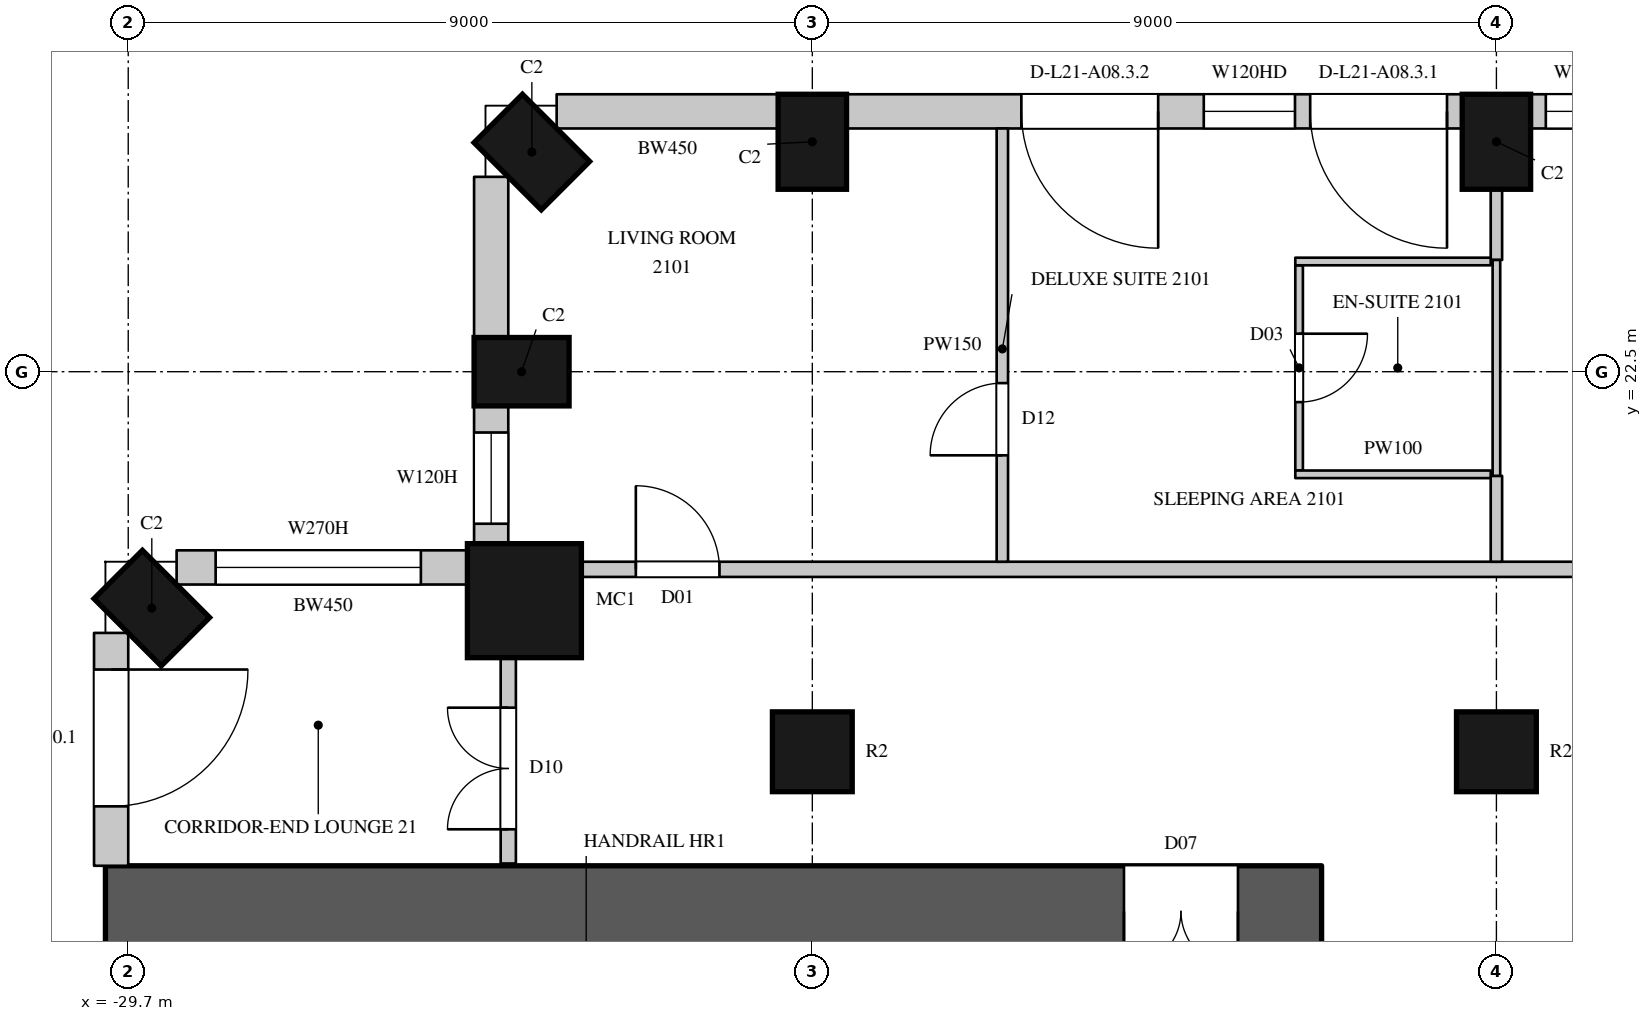
"""IFC4 building model, lengths in metres.
Left out: names, types, materials, properties, quantities, classifications, styles, units other than length and angle.
Written with IfcOpenShell. Run it as: python <this file> out.ifc"""

import sys

from ifc_helpers import new_model, si_unit, direction, frame, frame_2d, origin, origin_2d, place, context, subcontext, project, spatial, rectangle, circle, extrude, element, fill, save


model = new_model("IFC4")
c1 = context("Model", 3, precision=1e-05, world=origin(), true_north=direction((0.0, 1.0)))
c2 = subcontext(c1, "Body", "Model", "MODEL_VIEW")
j1 = project(units=[si_unit("LENGTHUNIT", "METRE"), si_unit("PLANEANGLEUNIT", "RADIAN")], contexts=[c1])
p1 = place(None, origin())
s1 = spatial("IfcSite", under=j1, at=p1, CompositionType="ELEMENT")
p2 = place(p1, origin())
s2 = spatial("IfcBuilding", under=s1, at=p2, CompositionType="ELEMENT")
p3 = place(p2, frame((0.0, 0.0, 105.9)))
s3 = spatial("IfcBuildingStorey", under=s2, at=p3, CompositionType="ELEMENT", Elevation=105.9)
for number, where, z_axis, x_axis in (
    (1, (-29.39, 19.39, 0.0), (0.0, 0.0, 1.0), (-0.707, -0.707, 0.0)),
    (2, (-11.7, 25.525, 0.0), (0.0, 0.0, 1.0), (-1.0, 0.0, 0.0)),
    (3, (-20.7, 25.525, 0.0), (0.0, 0.0, 1.0), (-1.0, 0.0, 0.0)),
    (4, (-24.39, 25.39, 0.0), (0.0, 0.0, 1.0), (-0.707, -0.707, 0.0)),
    (5, (-24.525, 22.5, 0.0), (0.0, 0.0, 1.0), (0.0, -1.0, 0.0)),
):
    element("IfcColumn", number, at=place(p3, frame(where, z_axis=z_axis, x_axis=x_axis)), inside=s3, PredefinedType="COLUMN", context=c2, shape_type="SweptSolid", body=[
        extrude(rectangle(XDim=0.9, YDim=1.25, at=origin_2d()), origin(), (0.0, 0.0, 1.0), 3.6),
    ])
p4 = place(p3, frame((-24.488, 19.488, 0.0), z_axis=(0.0, 0.0, 1.0), x_axis=(1.0, 0.0, 0.0)))
e6 = element("IfcColumn", 6, at=p4, inside=s3, PredefinedType="COLUMN", context=c2, shape_type="SweptSolid", body=[
    extrude(circle(Radius=0.75, at=origin_2d()), origin(), (0.0, 0.0, 1.0), 3.6),
])
for number, where, z_axis, x_axis in (
    (7, (-20.7, 17.5, 0.0), (0.0, 0.0, 1.0), (1.0, 0.0, 0.0)),
    (8, (-11.7, 17.5, 0.0), (0.0, 0.0, 1.0), (1.0, 0.0, 0.0)),
):
    element("IfcColumn", number, at=place(p3, frame(where, z_axis=z_axis, x_axis=x_axis)), inside=s3, PredefinedType="COLUMN", context=c2, shape_type="SweptSolid", body=[
        extrude(circle(Radius=0.525, at=origin_2d()), origin(), (0.0, 0.0, 1.0), 3.6),
    ])
p5 = place(p3, frame((-29.925, 19.064, 0.0), z_axis=(0.0, 0.0, 1.0), x_axis=(0.0, -1.0, 0.0)))
e9 = element("IfcWall", 9, at=p5, inside=s3, PredefinedType="SOLIDWALL", context=c2, shape_type="SweptSolid", body=[
    extrude(rectangle(XDim=3.064, YDim=0.45, at=frame_2d((1.532, 0.0))), origin(), (0.0, 0.0, 1.0), 3.3),
])
p6 = place(p5, frame((0.482, 0.0, 0.0)))
e10 = element("IfcOpeningElement", 10, at=p6, cuts=e9, PredefinedType="OPENING", context=c2, shape_type="SweptSolid", body=[
    extrude(rectangle(XDim=1.8, YDim=2.4, at=frame_2d((0.9, 1.2))), frame((0.0, 0.235, 0.0), z_axis=(0.0, -1.0, 0.0), x_axis=(1.0, 0.0, 0.0)), (0.0, 0.0, 1.0), 0.47),
])
p7 = place(p3, frame((-3.15, 25.925, 0.0), z_axis=(0.0, 0.0, 1.0), x_axis=(-1.0, 0.0, 0.0)))
e11 = element("IfcWall", 11, at=p7, inside=s3, PredefinedType="SOLIDWALL", context=c2, shape_type="SweptSolid", body=[
    extrude(rectangle(XDim=8.1, YDim=0.45, at=frame_2d((4.05, 0.0))), origin(), (0.0, 0.0, 1.0), 3.3),
])
p8 = place(p7, frame((0.2, 0.0, 0.0)))
e12 = element("IfcOpeningElement", 12, at=p8, cuts=e11, PredefinedType="OPENING", context=c2, shape_type="SweptSolid", body=[
    extrude(rectangle(XDim=1.8, YDim=2.4, at=frame_2d((0.9, 1.2))), frame((0.0, 0.235, 0.0), z_axis=(0.0, -1.0, 0.0), x_axis=(1.0, 0.0, 0.0)), (0.0, 0.0, 1.0), 0.47),
])
p9 = place(p7, frame((2.2, 0.0, 1.05)))
e13 = element("IfcOpeningElement", 13, at=p9, cuts=e11, PredefinedType="OPENING", context=c2, shape_type="SweptSolid", body=[
    extrude(rectangle(XDim=1.2, YDim=2.0, at=frame_2d((0.6, 1.0))), frame((0.0, 0.235, 0.0), z_axis=(0.0, -1.0, 0.0), x_axis=(1.0, 0.0, 0.0)), (0.0, 0.0, 1.0), 0.47),
])
p10 = place(p7, frame((4.7, 0.0, 0.0)))
e14 = element("IfcOpeningElement", 14, at=p10, cuts=e11, PredefinedType="OPENING", context=c2, shape_type="SweptSolid", body=[
    extrude(rectangle(XDim=1.8, YDim=2.4, at=frame_2d((0.9, 1.2))), frame((0.0, 0.235, 0.0), z_axis=(0.0, -1.0, 0.0), x_axis=(1.0, 0.0, 0.0)), (0.0, 0.0, 1.0), 0.47),
])
p11 = place(p7, frame((6.7, 0.0, 1.05)))
e15 = element("IfcOpeningElement", 15, at=p11, cuts=e11, PredefinedType="OPENING", context=c2, shape_type="SweptSolid", body=[
    extrude(rectangle(XDim=1.2, YDim=2.0, at=frame_2d((0.6, 1.0))), frame((0.0, 0.235, 0.0), z_axis=(0.0, -1.0, 0.0), x_axis=(1.0, 0.0, 0.0)), (0.0, 0.0, 1.0), 0.47),
])
p12 = place(p3, frame((-12.15, 25.925, 0.0), z_axis=(0.0, 0.0, 1.0), x_axis=(-1.0, 0.0, 0.0)))
e16 = element("IfcWall", 16, at=p12, inside=s3, PredefinedType="SOLIDWALL", context=c2, shape_type="SweptSolid", body=[
    extrude(rectangle(XDim=8.1, YDim=0.45, at=frame_2d((4.05, 0.0))), origin(), (0.0, 0.0, 1.0), 3.3),
])
p13 = place(p12, frame((0.2, 0.0, 0.0)))
e17 = element("IfcOpeningElement", 17, at=p13, cuts=e16, PredefinedType="OPENING", context=c2, shape_type="SweptSolid", body=[
    extrude(rectangle(XDim=1.8, YDim=2.4, at=frame_2d((0.9, 1.2))), frame((0.0, 0.235, 0.0), z_axis=(0.0, -1.0, 0.0), x_axis=(1.0, 0.0, 0.0)), (0.0, 0.0, 1.0), 0.47),
])
p14 = place(p12, frame((2.2, 0.0, 1.05)))
e18 = element("IfcOpeningElement", 18, at=p14, cuts=e16, PredefinedType="OPENING", context=c2, shape_type="SweptSolid", body=[
    extrude(rectangle(XDim=1.2, YDim=2.0, at=frame_2d((0.6, 1.0))), frame((0.0, 0.235, 0.0), z_axis=(0.0, -1.0, 0.0), x_axis=(1.0, 0.0, 0.0)), (0.0, 0.0, 1.0), 0.47),
])
p15 = place(p12, frame((4.0, 0.0, 0.0)))
e19 = element("IfcOpeningElement", 19, at=p15, cuts=e16, PredefinedType="OPENING", context=c2, shape_type="SweptSolid", body=[
    extrude(rectangle(XDim=1.8, YDim=2.4, at=frame_2d((0.9, 1.2))), frame((0.0, 0.235, 0.0), z_axis=(0.0, -1.0, 0.0), x_axis=(1.0, 0.0, 0.0)), (0.0, 0.0, 1.0), 0.47),
])
p16 = place(p3, frame((-21.15, 25.925, 0.0), z_axis=(0.0, 0.0, 1.0), x_axis=(-1.0, 0.0, 0.0)))
e20 = element("IfcWall", 20, at=p16, inside=s3, PredefinedType="SOLIDWALL", context=c2, shape_type="SweptSolid", body=[
    extrude(rectangle(XDim=2.914, YDim=0.45, at=frame_2d((1.457, 0.0))), origin(), (0.0, 0.0, 1.0), 3.3),
])
p17 = place(p3, frame((-24.925, 25.064, 0.0), z_axis=(0.0, 0.0, 1.0), x_axis=(0.0, -1.0, 0.0)))
e21 = element("IfcWall", 21, at=p17, inside=s3, PredefinedType="SOLIDWALL", context=c2, shape_type="SweptSolid", body=[
    extrude(rectangle(XDim=2.114, YDim=0.45, at=frame_2d((1.057, 0.0))), origin(), (0.0, 0.0, 1.0), 3.3),
])
p18 = place(p3, frame((-24.925, 22.05, 0.0), z_axis=(0.0, 0.0, 1.0), x_axis=(0.0, -1.0, 0.0)))
e22 = element("IfcWall", 22, at=p18, inside=s3, PredefinedType="SOLIDWALL", context=c2, shape_type="SweptSolid", body=[
    extrude(rectangle(XDim=1.843, YDim=0.45, at=frame_2d((0.921, 0.0))), origin(), (0.0, 0.0, 1.0), 3.3),
])
p19 = place(p18, frame((0.35, 0.0, 1.05)))
e23 = element("IfcOpeningElement", 23, at=p19, cuts=e22, PredefinedType="OPENING", context=c2, shape_type="SweptSolid", body=[
    extrude(rectangle(XDim=1.2, YDim=2.0, at=frame_2d((0.6, 1.0))), frame((0.0, 0.235, 0.0), z_axis=(0.0, -1.0, 0.0), x_axis=(1.0, 0.0, 0.0)), (0.0, 0.0, 1.0), 0.47),
])
p20 = place(p3, frame((-25.207, 19.925, 0.0), z_axis=(0.0, 0.0, 1.0), x_axis=(-1.0, 0.0, 0.0)))
e24 = element("IfcWall", 24, at=p20, inside=s3, PredefinedType="SOLIDWALL", context=c2, shape_type="SweptSolid", body=[
    extrude(rectangle(XDim=3.857, YDim=0.45, at=frame_2d((1.928, 0.0))), origin(), (0.0, 0.0, 1.0), 3.3),
])
p21 = place(p20, frame((0.643, 0.0, 1.05)))
e25 = element("IfcOpeningElement", 25, at=p21, cuts=e24, PredefinedType="OPENING", context=c2, shape_type="SweptSolid", body=[
    extrude(rectangle(XDim=2.7, YDim=2.0, at=frame_2d((1.35, 1.0))), frame((0.0, 0.235, 0.0), z_axis=(0.0, -1.0, 0.0), x_axis=(1.0, 0.0, 0.0)), (0.0, 0.0, 1.0), 0.47),
])
p22 = place(p3, frame((-30.0, 15.4, 0.0), z_axis=(0.0, 0.0, 1.0), x_axis=(1.0, 0.0, 0.0)))
e26 = element("IfcWall", 26, at=p22, inside=s3, PredefinedType="SHEAR", context=c2, shape_type="SweptSolid", body=[
    extrude(rectangle(XDim=16.0, YDim=1.2, at=frame_2d((8.0, 0.0))), origin(), (0.0, 0.0, 1.0), 3.6),
])
p23 = place(p22, frame((13.4, 0.0, 0.0)))
e27 = element("IfcOpeningElement", 27, at=p23, cuts=e26, PredefinedType="OPENING", context=c2, shape_type="SweptSolid", body=[
    extrude(rectangle(XDim=1.5, YDim=2.4, at=frame_2d((0.75, 1.2))), frame((0.0, 0.61, 0.0), z_axis=(0.0, -1.0, 0.0), x_axis=(1.0, 0.0, 0.0)), (0.0, 0.0, 1.0), 1.22),
])
p24 = place(p3, frame((-24.7, 16.03, 0.0), z_axis=(0.0, 0.0, 1.0), x_axis=(0.0, 1.0, 0.0)))
e28 = element("IfcWall", 28, at=p24, inside=s3, PredefinedType="PARTITIONING", context=c2, shape_type="SweptSolid", body=[
    extrude(rectangle(XDim=2.722, YDim=0.2, at=frame_2d((1.361, 0.0))), origin(), (0.0, 0.0, 1.0), 3.3),
])
p25 = place(p24, frame((0.45, 0.0, 0.0)))
e29 = element("IfcOpeningElement", 29, at=p25, cuts=e28, PredefinedType="OPENING", context=c2, shape_type="SweptSolid", body=[
    extrude(rectangle(XDim=1.6, YDim=2.4, at=frame_2d((0.8, 1.2))), frame((0.0, 0.11, 0.0), z_axis=(0.0, -1.0, 0.0), x_axis=(1.0, 0.0, 0.0)), (0.0, 0.0, 1.0), 0.22),
])
p26 = place(p3, frame((-23.822, 19.9, 0.0), z_axis=(0.0, 0.0, 1.0), x_axis=(1.0, 0.0, 0.0)))
e30 = element("IfcWall", 30, at=p26, inside=s3, PredefinedType="PARTITIONING", context=c2, shape_type="SweptSolid", body=[
    extrude(rectangle(XDim=41.605, YDim=0.2, at=frame_2d((20.803, 0.0))), origin(), (0.0, 0.0, 1.0), 3.3),
])
p27 = place(p26, frame((14.25, 0.0, 0.0)))
e31 = element("IfcOpeningElement", 31, at=p27, cuts=e30, PredefinedType="OPENING", context=c2, shape_type="SweptSolid", body=[
    extrude(rectangle(XDim=0.9, YDim=2.2, at=frame_2d((0.45, 1.1))), frame((0.0, 0.11, 0.0), z_axis=(0.0, -1.0, 0.0), x_axis=(1.0, 0.0, 0.0)), (0.0, 0.0, 1.0), 0.22),
])
p28 = place(p26, frame((27.1, 0.0, 0.0)))
e32 = element("IfcOpeningElement", 32, at=p28, cuts=e30, PredefinedType="OPENING", context=c2, shape_type="SweptSolid", body=[
    extrude(rectangle(XDim=0.9, YDim=2.2, at=frame_2d((0.45, 1.1))), frame((0.0, 0.11, 0.0), z_axis=(0.0, -1.0, 0.0), x_axis=(1.0, 0.0, 0.0)), (0.0, 0.0, 1.0), 0.22),
])
p29 = place(p26, frame((0.8, 0.0, 0.0)))
e33 = element("IfcOpeningElement", 33, at=p29, cuts=e30, PredefinedType="OPENING", context=c2, shape_type="SweptSolid", body=[
    extrude(rectangle(XDim=1.1, YDim=2.4, at=frame_2d((0.55, 1.2))), frame((0.0, 0.11, 0.0), z_axis=(0.0, -1.0, 0.0), x_axis=(1.0, 0.0, 0.0)), (0.0, 0.0, 1.0), 0.22),
])
p30 = place(p26, frame((23.2, 0.0, 0.0)))
e34 = element("IfcOpeningElement", 34, at=p30, cuts=e30, PredefinedType="OPENING", context=c2, shape_type="SweptSolid", body=[
    extrude(rectangle(XDim=0.95, YDim=2.2, at=frame_2d((0.475, 1.1))), frame((0.0, 0.11, 0.0), z_axis=(0.0, -1.0, 0.0), x_axis=(1.0, 0.0, 0.0)), (0.0, 0.0, 1.0), 0.22),
])
p31 = place(p26, frame((35.0, 0.0, 0.0)))
e35 = element("IfcOpeningElement", 35, at=p31, cuts=e30, PredefinedType="OPENING", context=c2, shape_type="SweptSolid", body=[
    extrude(rectangle(XDim=0.95, YDim=2.2, at=frame_2d((0.475, 1.1))), frame((0.0, 0.11, 0.0), z_axis=(0.0, -1.0, 0.0), x_axis=(1.0, 0.0, 0.0)), (0.0, 0.0, 1.0), 0.22),
])
p32 = place(p3, frame((-18.2, 20.0, 0.0), z_axis=(0.0, 0.0, 1.0), x_axis=(0.0, 1.0, 0.0)))
e36 = element("IfcWall", 36, at=p32, inside=s3, PredefinedType="PARTITIONING", context=c2, shape_type="SweptSolid", body=[
    extrude(rectangle(XDim=5.7, YDim=0.15, at=frame_2d((2.85, 0.0))), origin(), (0.0, 0.0, 1.0), 3.3),
])
p33 = place(p32, frame((1.4, 0.0, 0.0)))
e37 = element("IfcOpeningElement", 37, at=p33, cuts=e36, PredefinedType="OPENING", context=c2, shape_type="SweptSolid", body=[
    extrude(rectangle(XDim=0.95, YDim=2.2, at=frame_2d((0.475, 1.1))), frame((0.0, 0.085, 0.0), z_axis=(0.0, -1.0, 0.0), x_axis=(1.0, 0.0, 0.0)), (0.0, 0.0, 1.0), 0.17),
])
p34 = place(p3, frame((-11.7, 20.0, 0.0), z_axis=(0.0, 0.0, 1.0), x_axis=(0.0, 1.0, 0.0)))
e38 = element("IfcWall", 38, at=p34, inside=s3, PredefinedType="PARTITIONING", context=c2, shape_type="SweptSolid", body=[
    extrude(rectangle(XDim=1.13, YDim=0.15, at=frame_2d((0.565, 0.0))), origin(), (0.0, 0.0, 1.0), 2.75),
])
p35 = place(p3, frame((-11.7, 23.97, 0.0), z_axis=(0.0, 0.0, 1.0), x_axis=(0.0, 1.0, 0.0)))
e39 = element("IfcWall", 39, at=p35, inside=s3, PredefinedType="PARTITIONING", context=c2, shape_type="SweptSolid", body=[
    extrude(rectangle(XDim=0.93, YDim=0.15, at=frame_2d((0.465, 0.0))), origin(), (0.0, 0.0, 1.0), 2.75),
])
p36 = place(p3, frame((-14.296, 21.2, 0.0), z_axis=(0.0, 0.0, 1.0), x_axis=(0.0, 1.0, 0.0)))
e40 = element("IfcWall", 40, at=p36, inside=s3, PredefinedType="PARTITIONING", context=c2, shape_type="SweptSolid", body=[
    extrude(rectangle(XDim=2.7, YDim=0.1, at=frame_2d((1.35, 0.0))), origin(), (0.0, 0.0, 1.0), 3.3),
])
p37 = place(p36, frame((0.9, 0.0, 0.0)))
e41 = element("IfcOpeningElement", 41, at=p37, cuts=e40, PredefinedType="OPENING", context=c2, shape_type="SweptSolid", body=[
    extrude(rectangle(XDim=0.9, YDim=2.2, at=frame_2d((0.45, 1.1))), frame((0.0, 0.06, 0.0), z_axis=(0.0, -1.0, 0.0), x_axis=(1.0, 0.0, 0.0)), (0.0, 0.0, 1.0), 0.12),
])
for number, where, z_axis, x_axis in (
    (42, (-14.346, 21.15, 0.0), (0.0, 0.0, 1.0), (1.0, 0.0, 0.0)),
    (43, (-14.346, 23.95, 0.0), (0.0, 0.0, 1.0), (1.0, 0.0, 0.0)),
):
    element("IfcWall", number, at=place(p3, frame(where, z_axis=z_axis, x_axis=x_axis)), inside=s3, PredefinedType="PARTITIONING", context=c2, shape_type="SweptSolid", body=[
        extrude(rectangle(XDim=2.571, YDim=0.1, at=frame_2d((1.286, 0.0))), origin(), (0.0, 0.0, 1.0), 3.3),
    ])
p38 = place(p3, frame((-11.7, 21.13, 0.0), z_axis=(0.0, 0.0, 1.0), x_axis=(0.0, 1.0, 0.0)))
e44 = element("IfcWall", 44, at=p38, inside=s3, PredefinedType="PARTITIONING", context=c2, shape_type="SweptSolid", body=[
    extrude(rectangle(XDim=2.84, YDim=0.1, at=frame_2d((1.42, 0.0))), origin(), (0.0, 0.0, 1.0), 2.75),
])
p39 = place(p6, origin())
e45 = element("IfcDoor", 45, at=p39, inside=s3, OperationType="SLIDING_TO_LEFT", PredefinedType="DOOR", context=c2, shape_type="SweptSolid", body=[
    extrude(rectangle(XDim=1.8, YDim=2.4, at=frame_2d((0.9, 1.2))), frame((0.0, 0.13, 0.0), z_axis=(0.0, -1.0, 0.0), x_axis=(1.0, 0.0, 0.0)), (0.0, 0.0, 1.0), 0.05),
])
fill(e10, e45)
p40 = place(p11, origin())
e46 = element("IfcWindow", 46, at=p40, inside=s3, PartitioningType="SINGLE_PANEL", PredefinedType="WINDOW", context=c2, shape_type="SweptSolid", body=[
    extrude(rectangle(XDim=1.2, YDim=2.0, at=frame_2d((0.6, 1.0))), frame((0.0, 0.135, 0.0), z_axis=(0.0, -1.0, 0.0), x_axis=(1.0, 0.0, 0.0)), (0.0, 0.0, 1.0), 0.06),
])
fill(e15, e46)
p41 = place(p13, origin())
e47 = element("IfcDoor", 47, at=p41, inside=s3, OperationType="SLIDING_TO_LEFT", PredefinedType="DOOR", context=c2, shape_type="SweptSolid", body=[
    extrude(rectangle(XDim=1.8, YDim=2.4, at=frame_2d((0.9, 1.2))), frame((0.0, 0.13, 0.0), z_axis=(0.0, -1.0, 0.0), x_axis=(1.0, 0.0, 0.0)), (0.0, 0.0, 1.0), 0.05),
])
fill(e17, e47)
p42 = place(p14, origin())
e48 = element("IfcWindow", 48, at=p42, inside=s3, PartitioningType="SINGLE_PANEL", PredefinedType="WINDOW", context=c2, shape_type="SweptSolid", body=[
    extrude(rectangle(XDim=1.2, YDim=2.0, at=frame_2d((0.6, 1.0))), frame((0.0, 0.135, 0.0), z_axis=(0.0, -1.0, 0.0), x_axis=(1.0, 0.0, 0.0)), (0.0, 0.0, 1.0), 0.06),
])
fill(e18, e48)
p43 = place(p15, origin())
e49 = element("IfcDoor", 49, at=p43, inside=s3, OperationType="SLIDING_TO_LEFT", PredefinedType="DOOR", context=c2, shape_type="SweptSolid", body=[
    extrude(rectangle(XDim=1.8, YDim=2.4, at=frame_2d((0.9, 1.2))), frame((0.0, 0.13, 0.0), z_axis=(0.0, -1.0, 0.0), x_axis=(1.0, 0.0, 0.0)), (0.0, 0.0, 1.0), 0.05),
])
fill(e19, e49)
p44 = place(p19, origin())
e50 = element("IfcWindow", 50, at=p44, inside=s3, PartitioningType="SINGLE_PANEL", PredefinedType="WINDOW", context=c2, shape_type="SweptSolid", body=[
    extrude(rectangle(XDim=1.2, YDim=2.0, at=frame_2d((0.6, 1.0))), frame((0.0, 0.135, 0.0), z_axis=(0.0, -1.0, 0.0), x_axis=(1.0, 0.0, 0.0)), (0.0, 0.0, 1.0), 0.06),
])
fill(e23, e50)
p45 = place(p21, origin())
e51 = element("IfcWindow", 51, at=p45, inside=s3, PartitioningType="SINGLE_PANEL", PredefinedType="WINDOW", context=c2, shape_type="SweptSolid", body=[
    extrude(rectangle(XDim=2.7, YDim=2.0, at=frame_2d((1.35, 1.0))), frame((0.0, 0.135, 0.0), z_axis=(0.0, -1.0, 0.0), x_axis=(1.0, 0.0, 0.0)), (0.0, 0.0, 1.0), 0.06),
])
fill(e25, e51)
p46 = place(p25, origin())
e52 = element("IfcDoor", 52, at=p46, inside=s3, OperationType="DOUBLE_DOOR_SINGLE_SWING", PredefinedType="DOOR", context=c2, shape_type="SweptSolid", body=[
    extrude(rectangle(XDim=1.6, YDim=2.4, at=frame_2d((0.8, 1.2))), frame((0.0, 0.025, 0.0), z_axis=(0.0, -1.0, 0.0), x_axis=(1.0, 0.0, 0.0)), (0.0, 0.0, 1.0), 0.05),
])
fill(e29, e52)
p47 = place(p29, origin())
e53 = element("IfcDoor", 53, at=p47, inside=s3, OperationType="SINGLE_SWING_LEFT", PredefinedType="DOOR", context=c2, shape_type="SweptSolid", body=[
    extrude(rectangle(XDim=1.1, YDim=2.4, at=frame_2d((0.55, 1.2))), frame((0.0, 0.025, 0.0), z_axis=(0.0, -1.0, 0.0), x_axis=(1.0, 0.0, 0.0)), (0.0, 0.0, 1.0), 0.05),
])
fill(e33, e53)
p48 = place(p33, origin())
e54 = element("IfcDoor", 54, at=p48, inside=s3, OperationType="SINGLE_SWING_LEFT", PredefinedType="DOOR", context=c2, shape_type="SweptSolid", body=[
    extrude(rectangle(XDim=0.95, YDim=2.2, at=frame_2d((0.475, 1.1))), frame((0.0, 0.025, 0.0), z_axis=(0.0, -1.0, 0.0), x_axis=(1.0, 0.0, 0.0)), (0.0, 0.0, 1.0), 0.05),
])
fill(e37, e54)
p49 = place(p37, origin())
e55 = element("IfcDoor", 55, at=p49, inside=s3, OperationType="SINGLE_SWING_LEFT", PredefinedType="DOOR", context=c2, shape_type="SweptSolid", body=[
    extrude(rectangle(XDim=0.9, YDim=2.2, at=frame_2d((0.45, 1.1))), frame((0.0, 0.025, 0.0), z_axis=(0.0, -1.0, 0.0), x_axis=(1.0, 0.0, 0.0)), (0.0, 0.0, 1.0), 0.05),
])
fill(e41, e55)
p50 = place(p23, origin())
e56 = element("IfcDoor", 56, at=p50, inside=s3, OperationType="DOUBLE_DOOR_SINGLE_SWING", PredefinedType="DOOR", context=c2, shape_type="SweptSolid", body=[
    extrude(rectangle(XDim=1.5, YDim=2.4, at=frame_2d((0.75, 1.2))), frame((0.0, 0.025, 0.0), z_axis=(0.0, -1.0, 0.0), x_axis=(1.0, 0.0, 0.0)), (0.0, 0.0, 1.0), 0.05),
])
fill(e27, e56)
save(model, sys.argv[1])
